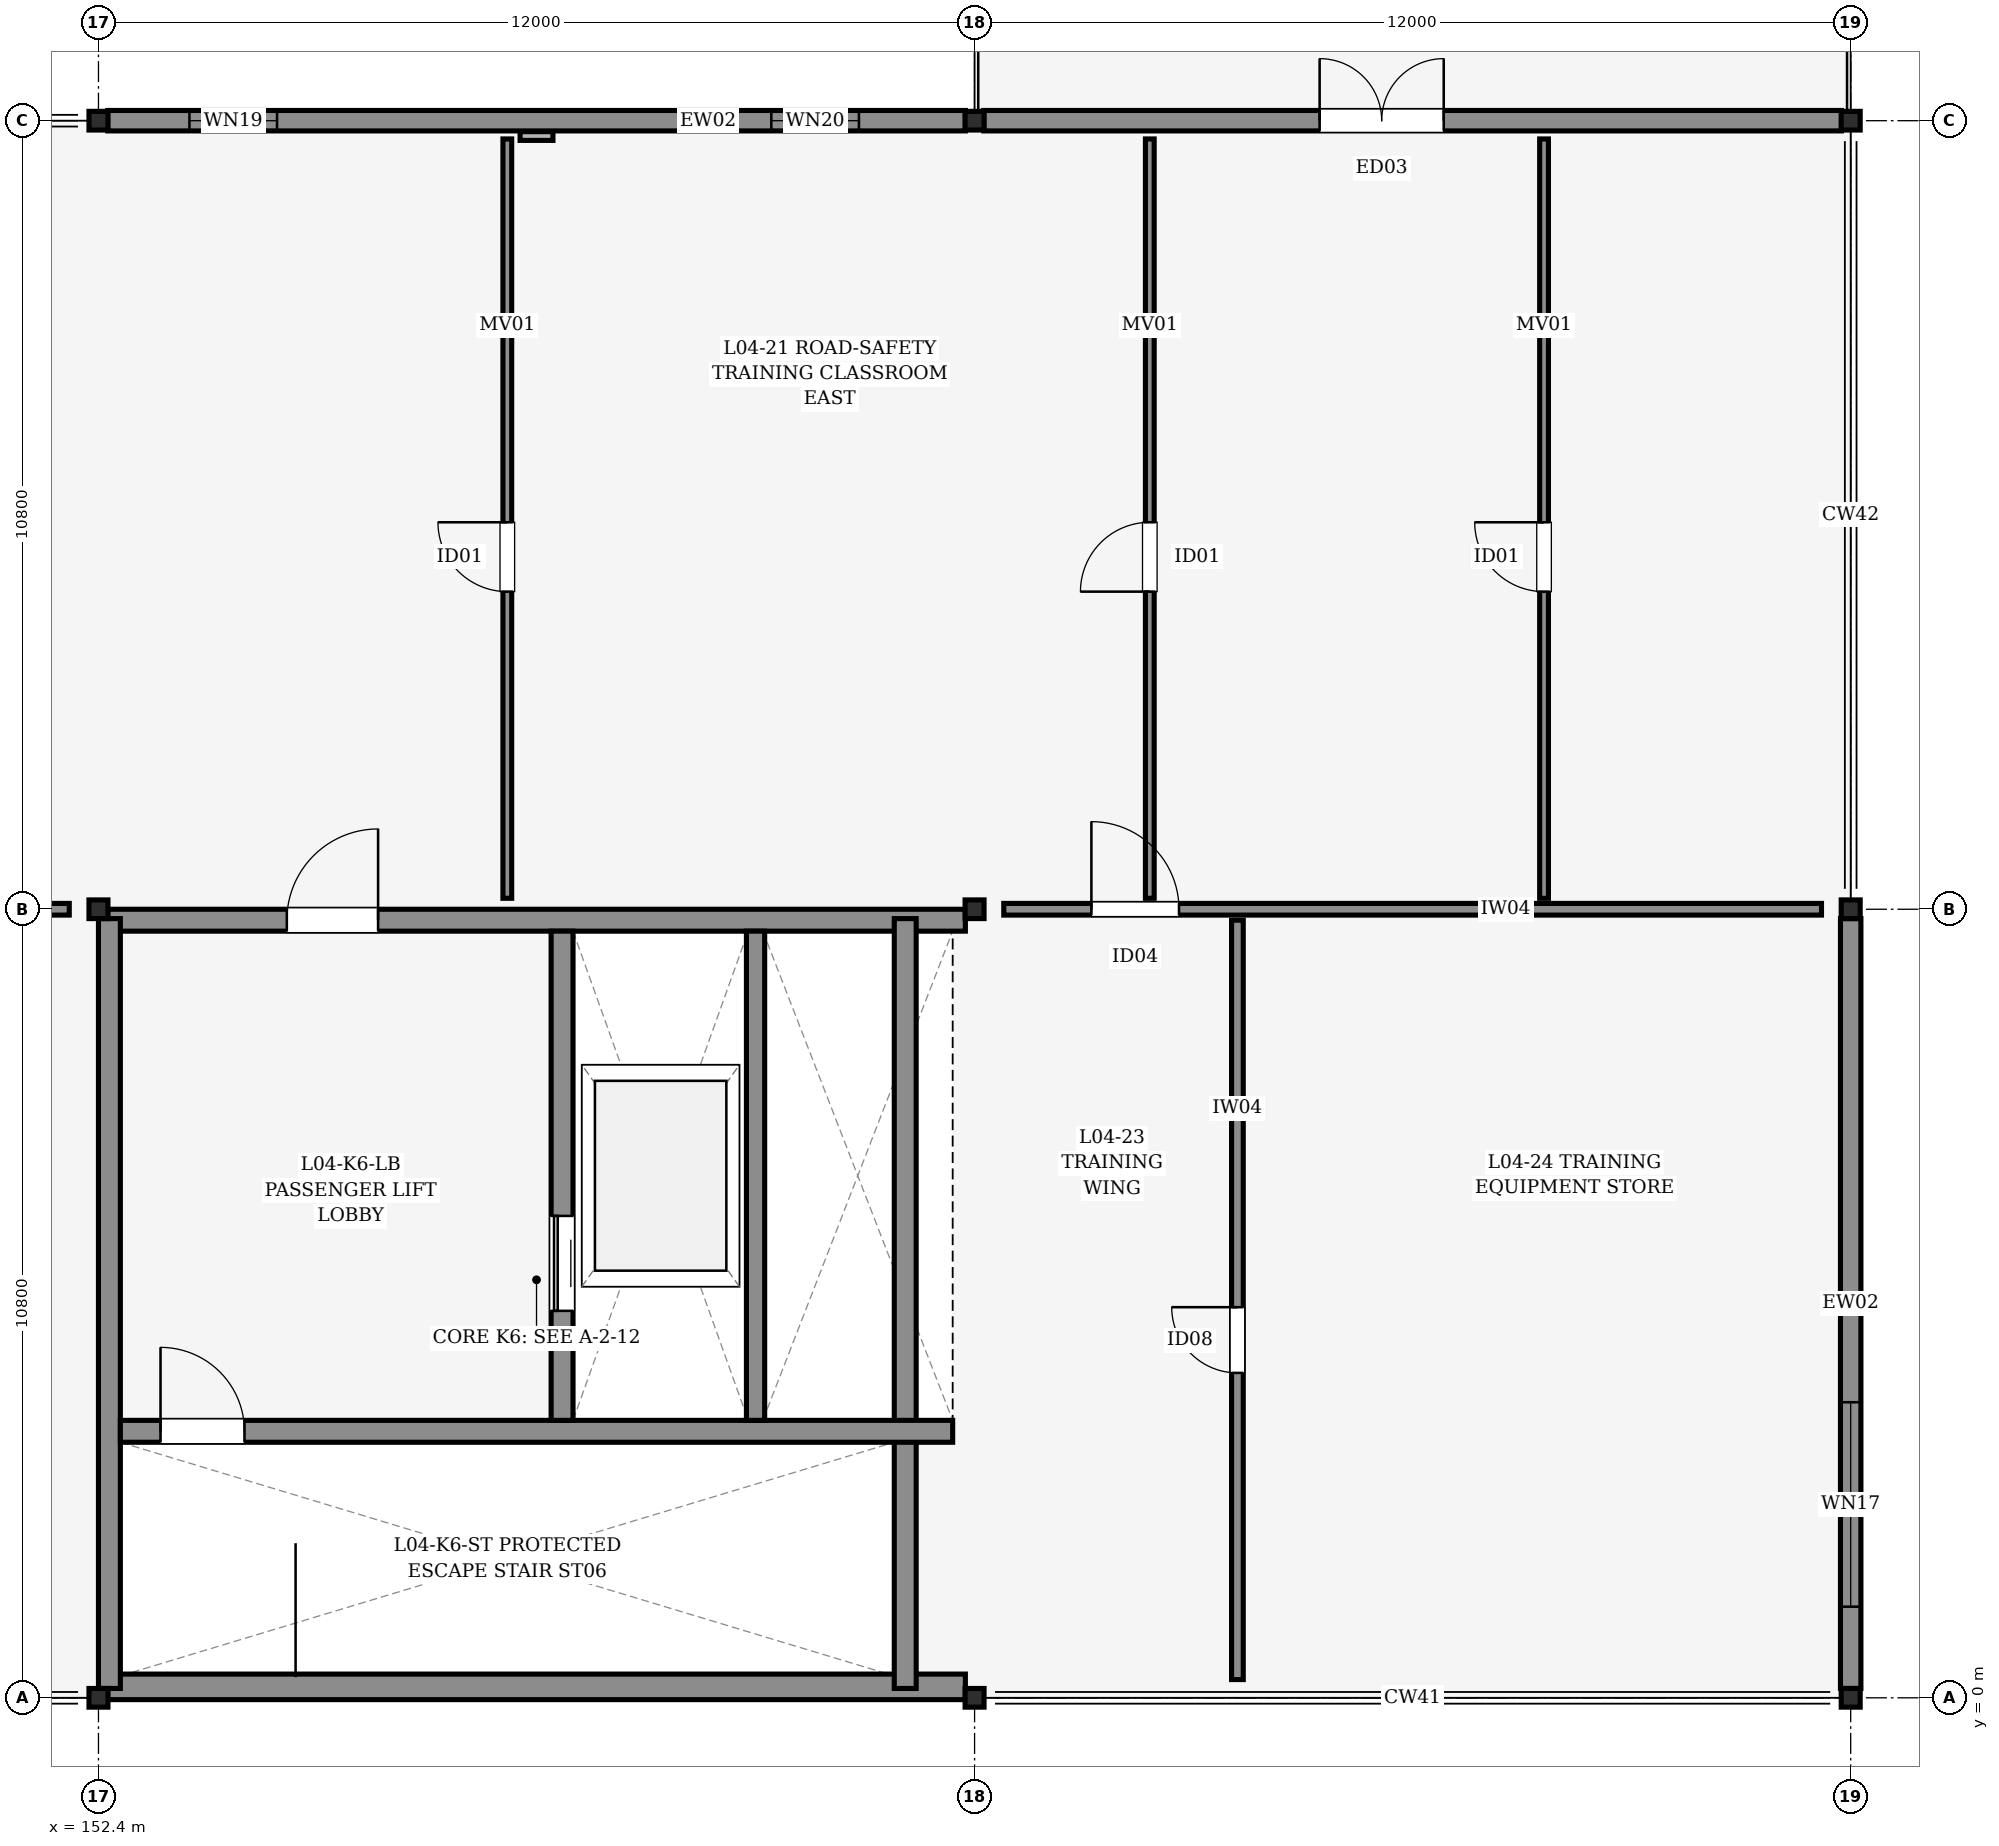
"""IFC4 building model, lengths in metres.
Left out: names, types, materials, properties, quantities, classifications, styles, units other than length and angle.
Written with IfcOpenShell. Run it as: python <this file> out.ifc"""

import sys

from ifc_helpers import new_model, si_unit, direction, frame, frame_2d, origin, origin_2d, place, context, subcontext, project, spatial, rectangle, i_section, extrude, element, fill, save


model = new_model("IFC4")
c1 = context("Model", 3, precision=1e-05, world=origin(), true_north=direction((0.0, 1.0)))
c2 = subcontext(c1, "Body", "Model", "MODEL_VIEW")
j1 = project(units=[si_unit("LENGTHUNIT", "METRE"), si_unit("PLANEANGLEUNIT", "RADIAN")], contexts=[c1])
p1 = place(None, origin())
s1 = spatial("IfcSite", under=j1, at=p1, CompositionType="ELEMENT")
p2 = place(p1, origin())
s2 = spatial("IfcBuilding", under=s1, at=p2, CompositionType="ELEMENT")
p3 = place(p2, frame((0.0, 0.0, 16.2)))
s3 = spatial("IfcBuildingStorey", under=s2, at=p3, CompositionType="ELEMENT", Elevation=16.2)
for number, where, z_axis, x_axis in (
    (1, (152.4, 0.0, 0.0), (0.0, 0.0, 1.0), (1.0, 0.0, 0.0)),
    (2, (152.4, 10.8, 0.0), (0.0, 0.0, 1.0), (1.0, 0.0, 0.0)),
    (3, (152.4, 21.6, 0.0), (0.0, 0.0, 1.0), (1.0, 0.0, 0.0)),
    (4, (164.4, 0.0, 0.0), (0.0, 0.0, 1.0), (1.0, 0.0, 0.0)),
    (5, (164.4, 10.8, 0.0), (0.0, 0.0, 1.0), (1.0, 0.0, 0.0)),
    (6, (164.4, 21.6, 0.0), (0.0, 0.0, 1.0), (1.0, 0.0, 0.0)),
    (7, (176.4, 0.0, 0.0), (0.0, 0.0, 1.0), (1.0, 0.0, 0.0)),
    (8, (176.4, 10.8, 0.0), (0.0, 0.0, 1.0), (1.0, 0.0, 0.0)),
    (9, (176.4, 21.6, 0.0), (0.0, 0.0, 1.0), (1.0, 0.0, 0.0)),
):
    element("IfcColumn", number, at=place(p3, frame(where, z_axis=z_axis, x_axis=x_axis)), inside=s3, PredefinedType="COLUMN", context=c2, shape_type="SweptSolid", body=[
        extrude(i_section(OverallWidth=0.256, OverallDepth=0.26, WebThickness=0.01, FlangeThickness=0.017, FilletRadius=0.013, at=origin_2d()), origin(), (0.0, 0.0, 1.0), 3.6),
    ])
p4 = place(p3, frame((164.526, 21.6, 0.0), z_axis=(0.0, 0.0, 1.0), x_axis=(1.0, 0.0, 0.0)))
e10 = element("IfcWall", 10, at=p4, inside=s3, PredefinedType="STANDARD", context=c2, shape_type="SweptSolid", body=[
    extrude(rectangle(XDim=11.748, YDim=0.28, at=frame_2d((5.874, 0.0))), origin(), (0.0, 0.0, 1.0), 2.535),
])
p5 = place(p4, frame((4.6, 0.0, 0.0)))
e11 = element("IfcOpeningElement", 11, at=p5, cuts=e10, PredefinedType="OPENING", context=c2, shape_type="SweptSolid", body=[
    extrude(rectangle(XDim=1.7, YDim=2.2, at=frame_2d((0.85, 1.1))), frame((0.0, 0.15, 0.0), z_axis=(0.0, -1.0, 0.0), x_axis=(1.0, 0.0, 0.0)), (0.0, 0.0, 1.0), 0.3),
])
p6 = place(p3, frame((176.4, 0.128, 0.0), z_axis=(0.0, 0.0, 1.0), x_axis=(0.0, 1.0, 0.0)))
e12 = element("IfcWall", 12, at=p6, inside=s3, PredefinedType="STANDARD", context=c2, shape_type="SweptSolid", body=[
    extrude(rectangle(XDim=10.544, YDim=0.28, at=frame_2d((5.272, 0.0))), origin(), (0.0, 0.0, 1.0), 2.535),
])
p7 = place(p6, frame((1.12, 0.0, 0.395)))
e13 = element("IfcOpeningElement", 13, at=p7, cuts=e12, PredefinedType="OPENING", context=c2, shape_type="SweptSolid", body=[
    extrude(rectangle(XDim=2.8, YDim=2.0, at=frame_2d((1.4, 1.0))), frame((0.0, 0.15, 0.0), z_axis=(0.0, -1.0, 0.0), x_axis=(1.0, 0.0, 0.0)), (0.0, 0.0, 1.0), 0.3),
])
p8 = place(p3, frame((152.526, 21.6, 0.0), z_axis=(0.0, 0.0, 1.0), x_axis=(1.0, 0.0, 0.0)))
e14 = element("IfcWall", 14, at=p8, inside=s3, PredefinedType="STANDARD", context=c2, shape_type="SweptSolid", body=[
    extrude(rectangle(XDim=11.748, YDim=0.28, at=frame_2d((5.874, 0.0))), origin(), (0.0, 0.0, 1.0), 2.535),
])
p9 = place(p8, frame((1.12, 0.0, 0.595)))
e15 = element("IfcOpeningElement", 15, at=p9, cuts=e14, PredefinedType="OPENING", context=c2, shape_type="SweptSolid", body=[
    extrude(rectangle(XDim=1.2, YDim=1.8, at=frame_2d((0.6, 0.9))), frame((0.0, 0.15, 0.0), z_axis=(0.0, -1.0, 0.0), x_axis=(1.0, 0.0, 0.0)), (0.0, 0.0, 1.0), 0.3),
])
p10 = place(p8, frame((9.09, 0.0, 0.65)))
e16 = element("IfcOpeningElement", 16, at=p10, cuts=e14, PredefinedType="OPENING", context=c2, shape_type="SweptSolid", body=[
    extrude(rectangle(XDim=1.2, YDim=1.2, at=frame_2d((0.6, 0.6))), frame((0.0, 0.15, 0.0), z_axis=(0.0, -1.0, 0.0), x_axis=(1.0, 0.0, 0.0)), (0.0, 0.0, 1.0), 0.3),
])
p11 = place(p3, frame((152.526, 0.15, 0.0), z_axis=(0.0, 0.0, 1.0), x_axis=(1.0, 0.0, 0.0)))
e17 = element("IfcWall", 17, at=p11, inside=s3, PredefinedType="SHEAR", context=c2, shape_type="SweptSolid", body=[
    extrude(rectangle(XDim=11.748, YDim=0.35, at=frame_2d((5.874, 0.0))), origin(), (0.0, 0.0, 1.0), 3.38),
])
p12 = place(p3, frame((152.526, 10.65, 0.0), z_axis=(0.0, 0.0, 1.0), x_axis=(1.0, 0.0, 0.0)))
e18 = element("IfcWall", 18, at=p12, inside=s3, PredefinedType="SHEAR", context=c2, shape_type="SweptSolid", body=[
    extrude(rectangle(XDim=11.748, YDim=0.3, at=frame_2d((5.874, 0.0))), origin(), (0.0, 0.0, 1.0), 3.38),
])
p13 = place(p12, frame((2.454, 0.0, 0.0)))
e19 = element("IfcOpeningElement", 19, at=p13, cuts=e18, PredefinedType="OPENING", context=c2, shape_type="SweptSolid", body=[
    extrude(rectangle(XDim=1.25, YDim=2.15, at=frame_2d((0.625, 1.075))), frame((0.0, 0.16, 0.0), z_axis=(0.0, -1.0, 0.0), x_axis=(1.0, 0.0, 0.0)), (0.0, 0.0, 1.0), 0.32),
])
for number, where, z_axis, x_axis in (
    (20, (152.55, 0.128, 0.0), (0.0, 0.0, 1.0), (0.0, 1.0, 0.0)),
    (21, (163.45, 0.128, 0.0), (0.0, 0.0, 1.0), (0.0, 1.0, 0.0)),
):
    element("IfcWall", number, at=place(p3, frame(where, z_axis=z_axis, x_axis=x_axis)), inside=s3, PredefinedType="SHEAR", context=c2, shape_type="SweptSolid", body=[
        extrude(rectangle(XDim=10.544, YDim=0.3, at=frame_2d((5.272, 0.0))), origin(), (0.0, 0.0, 1.0), 3.38),
    ])
p14 = place(p3, frame((152.7, 3.65, 0.0), z_axis=(0.0, 0.0, 1.0), x_axis=(1.0, 0.0, 0.0)))
e22 = element("IfcWall", 22, at=p14, inside=s3, PredefinedType="SHEAR", context=c2, shape_type="SweptSolid", body=[
    extrude(rectangle(XDim=11.4, YDim=0.3, at=frame_2d((5.7, 0.0))), origin(), (0.0, 0.0, 1.0), 3.38),
])
p15 = place(p14, frame((0.55, 0.0, 0.0)))
e23 = element("IfcOpeningElement", 23, at=p15, cuts=e22, PredefinedType="OPENING", context=c2, shape_type="SweptSolid", body=[
    extrude(rectangle(XDim=1.15, YDim=2.15, at=frame_2d((0.575, 1.075))), frame((0.0, 0.16, 0.0), z_axis=(0.0, -1.0, 0.0), x_axis=(1.0, 0.0, 0.0)), (0.0, 0.0, 1.0), 0.32),
])
p16 = place(p3, frame((158.75, 3.8, 0.0), z_axis=(0.0, 0.0, 1.0), x_axis=(0.0, 1.0, 0.0)))
e24 = element("IfcWall", 24, at=p16, inside=s3, PredefinedType="SHEAR", context=c2, shape_type="SweptSolid", body=[
    extrude(rectangle(XDim=6.7, YDim=0.3, at=frame_2d((3.35, 0.0))), origin(), (0.0, 0.0, 1.0), 3.38),
])
p17 = place(p16, frame((1.5, 0.0, 0.0)))
e25 = element("IfcOpeningElement", 25, at=p17, cuts=e24, PredefinedType="OPENING", context=c2, shape_type="SweptSolid", body=[
    extrude(rectangle(XDim=1.3, YDim=2.3, at=frame_2d((0.65, 1.15))), frame((0.0, 0.16, 0.0), z_axis=(0.0, -1.0, 0.0), x_axis=(1.0, 0.0, 0.0)), (0.0, 0.0, 1.0), 0.32),
])
p18 = place(p3, frame((161.4, 3.8, 0.0), z_axis=(0.0, 0.0, 1.0), x_axis=(0.0, 1.0, 0.0)))
e26 = element("IfcWall", 26, at=p18, inside=s3, PredefinedType="PARTITIONING", context=c2, shape_type="SweptSolid", body=[
    extrude(rectangle(XDim=6.7, YDim=0.25, at=frame_2d((3.35, 0.0))), origin(), (0.0, 0.0, 1.0), 2.525),
])
p19 = place(p3, frame((140.8, 10.8, 0.0), z_axis=(0.0, 0.0, 1.0), x_axis=(1.0, 0.0, 0.0)))
e27 = element("IfcWall", 27, at=p19, inside=s3, PredefinedType="PARTITIONING", context=c2, shape_type="SweptSolid", body=[
    extrude(rectangle(XDim=11.2, YDim=0.16, at=frame_2d((5.6, 0.0))), origin(), (0.0, 0.0, 1.0), 2.525),
])
p20 = place(p19, frame((4.8, 0.0, 0.0)))
e28 = element("IfcOpeningElement", 28, at=p20, cuts=e27, PredefinedType="OPENING", context=c2, shape_type="SweptSolid", body=[
    extrude(rectangle(XDim=1.2, YDim=2.15, at=frame_2d((0.6, 1.075))), frame((0.0, 0.09, 0.0), z_axis=(0.0, -1.0, 0.0), x_axis=(1.0, 0.0, 0.0)), (0.0, 0.0, 1.0), 0.18),
])
p21 = place(p3, frame((164.8, 10.8, 0.0), z_axis=(0.0, 0.0, 1.0), x_axis=(1.0, 0.0, 0.0)))
e29 = element("IfcWall", 29, at=p21, inside=s3, PredefinedType="PARTITIONING", context=c2, shape_type="SweptSolid", body=[
    extrude(rectangle(XDim=11.2, YDim=0.16, at=frame_2d((5.6, 0.0))), origin(), (0.0, 0.0, 1.0), 2.525),
])
p22 = place(p21, frame((1.2, 0.0, 0.0)))
e30 = element("IfcOpeningElement", 30, at=p22, cuts=e29, PredefinedType="OPENING", context=c2, shape_type="SweptSolid", body=[
    extrude(rectangle(XDim=1.2, YDim=2.15, at=frame_2d((0.6, 1.075))), frame((0.0, 0.09, 0.0), z_axis=(0.0, -1.0, 0.0), x_axis=(1.0, 0.0, 0.0)), (0.0, 0.0, 1.0), 0.18),
])
p23 = place(p3, frame((168.0, 0.25, 0.0), z_axis=(0.0, 0.0, 1.0), x_axis=(0.0, 1.0, 0.0)))
e31 = element("IfcWall", 31, at=p23, inside=s3, PredefinedType="PARTITIONING", context=c2, shape_type="SweptSolid", body=[
    extrude(rectangle(XDim=10.4, YDim=0.16, at=frame_2d((5.2, 0.0))), origin(), (0.0, 0.0, 1.0), 2.525),
])
p24 = place(p23, frame((4.2, 0.0, 0.0)))
e32 = element("IfcOpeningElement", 32, at=p24, cuts=e31, PredefinedType="OPENING", context=c2, shape_type="SweptSolid", body=[
    extrude(rectangle(XDim=0.9, YDim=2.05, at=frame_2d((0.45, 1.025))), frame((0.0, 0.09, 0.0), z_axis=(0.0, -1.0, 0.0), x_axis=(1.0, 0.0, 0.0)), (0.0, 0.0, 1.0), 0.18),
])
p25 = place(p3, frame((158.0, 10.95, 0.0), z_axis=(0.0, 0.0, 1.0), x_axis=(0.0, 1.0, 0.0)))
e33 = element("IfcWall", 33, at=p25, inside=s3, PredefinedType="MOVABLE", context=c2, shape_type="SweptSolid", body=[
    extrude(rectangle(XDim=10.4, YDim=0.12, at=frame_2d((5.2, 0.0))), origin(), (0.0, 0.0, 1.0), 2.525),
])
p26 = place(p25, frame((4.2, 0.0, 0.0)))
e34 = element("IfcOpeningElement", 34, at=p26, cuts=e33, PredefinedType="OPENING", context=c2, shape_type="SweptSolid", body=[
    extrude(rectangle(XDim=0.95, YDim=2.1, at=frame_2d((0.475, 1.05))), frame((0.0, 0.07, 0.0), z_axis=(0.0, -1.0, 0.0), x_axis=(1.0, 0.0, 0.0)), (0.0, 0.0, 1.0), 0.14),
])
p27 = place(p3, frame((166.8, 10.95, 0.0), z_axis=(0.0, 0.0, 1.0), x_axis=(0.0, 1.0, 0.0)))
e35 = element("IfcWall", 35, at=p27, inside=s3, PredefinedType="MOVABLE", context=c2, shape_type="SweptSolid", body=[
    extrude(rectangle(XDim=10.4, YDim=0.12, at=frame_2d((5.2, 0.0))), origin(), (0.0, 0.0, 1.0), 2.525),
])
p28 = place(p27, frame((4.2, 0.0, 0.0)))
e36 = element("IfcOpeningElement", 36, at=p28, cuts=e35, PredefinedType="OPENING", context=c2, shape_type="SweptSolid", body=[
    extrude(rectangle(XDim=0.95, YDim=2.1, at=frame_2d((0.475, 1.05))), frame((0.0, 0.07, 0.0), z_axis=(0.0, -1.0, 0.0), x_axis=(1.0, 0.0, 0.0)), (0.0, 0.0, 1.0), 0.14),
])
p29 = place(p3, frame((172.2, 10.95, 0.0), z_axis=(0.0, 0.0, 1.0), x_axis=(0.0, 1.0, 0.0)))
e37 = element("IfcWall", 37, at=p29, inside=s3, PredefinedType="MOVABLE", context=c2, shape_type="SweptSolid", body=[
    extrude(rectangle(XDim=10.4, YDim=0.12, at=frame_2d((5.2, 0.0))), origin(), (0.0, 0.0, 1.0), 2.525),
])
p30 = place(p29, frame((4.2, 0.0, 0.0)))
e38 = element("IfcOpeningElement", 38, at=p30, cuts=e37, PredefinedType="OPENING", context=c2, shape_type="SweptSolid", body=[
    extrude(rectangle(XDim=0.95, YDim=2.1, at=frame_2d((0.475, 1.05))), frame((0.0, 0.07, 0.0), z_axis=(0.0, -1.0, 0.0), x_axis=(1.0, 0.0, 0.0)), (0.0, 0.0, 1.0), 0.14),
])
p31 = place(p5, origin())
e39 = element("IfcDoor", 39, at=p31, inside=s3, OperationType="DOUBLE_DOOR_SINGLE_SWING", PredefinedType="DOOR", context=c2, shape_type="SweptSolid", body=[
    extrude(rectangle(XDim=1.7, YDim=2.2, at=frame_2d((0.85, 1.1))), frame((0.0, 0.025, 0.0), z_axis=(0.0, -1.0, 0.0), x_axis=(1.0, 0.0, 0.0)), (0.0, 0.0, 1.0), 0.05),
])
fill(e11, e39)
p32 = place(p7, origin())
e40 = element("IfcWindow", 40, at=p32, inside=s3, PartitioningType="SINGLE_PANEL", PredefinedType="WINDOW", context=c2, shape_type="SweptSolid", body=[
    extrude(rectangle(XDim=2.8, YDim=2.0, at=frame_2d((1.4, 1.0))), frame((0.0, 0.03, 0.0), z_axis=(0.0, -1.0, 0.0), x_axis=(1.0, 0.0, 0.0)), (0.0, 0.0, 1.0), 0.06),
])
fill(e13, e40)
p33 = place(p9, origin())
e41 = element("IfcWindow", 41, at=p33, inside=s3, PartitioningType="SINGLE_PANEL", PredefinedType="WINDOW", context=c2, shape_type="SweptSolid", body=[
    extrude(rectangle(XDim=1.2, YDim=1.8, at=frame_2d((0.6, 0.9))), frame((0.0, 0.03, 0.0), z_axis=(0.0, -1.0, 0.0), x_axis=(1.0, 0.0, 0.0)), (0.0, 0.0, 1.0), 0.06),
])
fill(e15, e41)
p34 = place(p10, origin())
e42 = element("IfcWindow", 42, at=p34, inside=s3, PartitioningType="SINGLE_PANEL", PredefinedType="WINDOW", context=c2, shape_type="SweptSolid", body=[
    extrude(rectangle(XDim=1.2, YDim=1.2, at=frame_2d((0.6, 0.6))), frame((0.0, 0.03, 0.0), z_axis=(0.0, -1.0, 0.0), x_axis=(1.0, 0.0, 0.0)), (0.0, 0.0, 1.0), 0.06),
])
fill(e16, e42)
p35 = place(p13, origin())
e43 = element("IfcDoor", 43, at=p35, inside=s3, OperationType="SINGLE_SWING_RIGHT", PredefinedType="DOOR", context=c2, shape_type="SweptSolid", body=[
    extrude(rectangle(XDim=1.25, YDim=2.15, at=frame_2d((0.625, 1.075))), frame((0.0, 0.025, 0.0), z_axis=(0.0, -1.0, 0.0), x_axis=(1.0, 0.0, 0.0)), (0.0, 0.0, 1.0), 0.05),
])
fill(e19, e43)
p36 = place(p15, origin())
e44 = element("IfcDoor", 44, at=p36, inside=s3, OperationType="SINGLE_SWING_LEFT", PredefinedType="DOOR", context=c2, shape_type="SweptSolid", body=[
    extrude(rectangle(XDim=1.15, YDim=2.15, at=frame_2d((0.575, 1.075))), frame((0.0, 0.025, 0.0), z_axis=(0.0, -1.0, 0.0), x_axis=(1.0, 0.0, 0.0)), (0.0, 0.0, 1.0), 0.05),
])
fill(e23, e44)
p37 = place(p17, origin())
e45 = element("IfcDoor", 45, at=p37, inside=s3, OperationType="SLIDING_TO_LEFT", PredefinedType="DOOR", context=c2, shape_type="SweptSolid", body=[
    extrude(rectangle(XDim=1.3, YDim=2.3, at=frame_2d((0.65, 1.15))), frame((0.0, 0.025, 0.0), z_axis=(0.0, -1.0, 0.0), x_axis=(1.0, 0.0, 0.0)), (0.0, 0.0, 1.0), 0.05),
])
fill(e25, e45)
p38 = place(p22, origin())
e46 = element("IfcDoor", 46, at=p38, inside=s3, OperationType="SINGLE_SWING_LEFT", PredefinedType="DOOR", context=c2, shape_type="SweptSolid", body=[
    extrude(rectangle(XDim=1.2, YDim=2.15, at=frame_2d((0.6, 1.075))), frame((0.0, 0.025, 0.0), z_axis=(0.0, -1.0, 0.0), x_axis=(1.0, 0.0, 0.0)), (0.0, 0.0, 1.0), 0.05),
])
fill(e30, e46)
p39 = place(p24, origin())
e47 = element("IfcDoor", 47, at=p39, inside=s3, OperationType="SINGLE_SWING_RIGHT", PredefinedType="DOOR", context=c2, shape_type="SweptSolid", body=[
    extrude(rectangle(XDim=0.9, YDim=2.05, at=frame_2d((0.45, 1.025))), frame((0.0, 0.025, 0.0), z_axis=(0.0, -1.0, 0.0), x_axis=(1.0, 0.0, 0.0)), (0.0, 0.0, 1.0), 0.05),
])
fill(e32, e47)
p40 = place(p26, origin())
e48 = element("IfcDoor", 48, at=p40, inside=s3, OperationType="SINGLE_SWING_RIGHT", PredefinedType="DOOR", context=c2, shape_type="SweptSolid", body=[
    extrude(rectangle(XDim=0.95, YDim=2.1, at=frame_2d((0.475, 1.05))), frame((0.0, 0.025, 0.0), z_axis=(0.0, -1.0, 0.0), x_axis=(1.0, 0.0, 0.0)), (0.0, 0.0, 1.0), 0.05),
])
fill(e34, e48)
p41 = place(p28, origin())
e49 = element("IfcDoor", 49, at=p41, inside=s3, OperationType="SINGLE_SWING_LEFT", PredefinedType="DOOR", context=c2, shape_type="SweptSolid", body=[
    extrude(rectangle(XDim=0.95, YDim=2.1, at=frame_2d((0.475, 1.05))), frame((0.0, 0.025, 0.0), z_axis=(0.0, -1.0, 0.0), x_axis=(1.0, 0.0, 0.0)), (0.0, 0.0, 1.0), 0.05),
])
fill(e36, e49)
p42 = place(p30, origin())
e50 = element("IfcDoor", 50, at=p42, inside=s3, OperationType="SINGLE_SWING_RIGHT", PredefinedType="DOOR", context=c2, shape_type="SweptSolid", body=[
    extrude(rectangle(XDim=0.95, YDim=2.1, at=frame_2d((0.475, 1.05))), frame((0.0, 0.025, 0.0), z_axis=(0.0, -1.0, 0.0), x_axis=(1.0, 0.0, 0.0)), (0.0, 0.0, 1.0), 0.05),
])
fill(e38, e50)
save(model, sys.argv[1])
